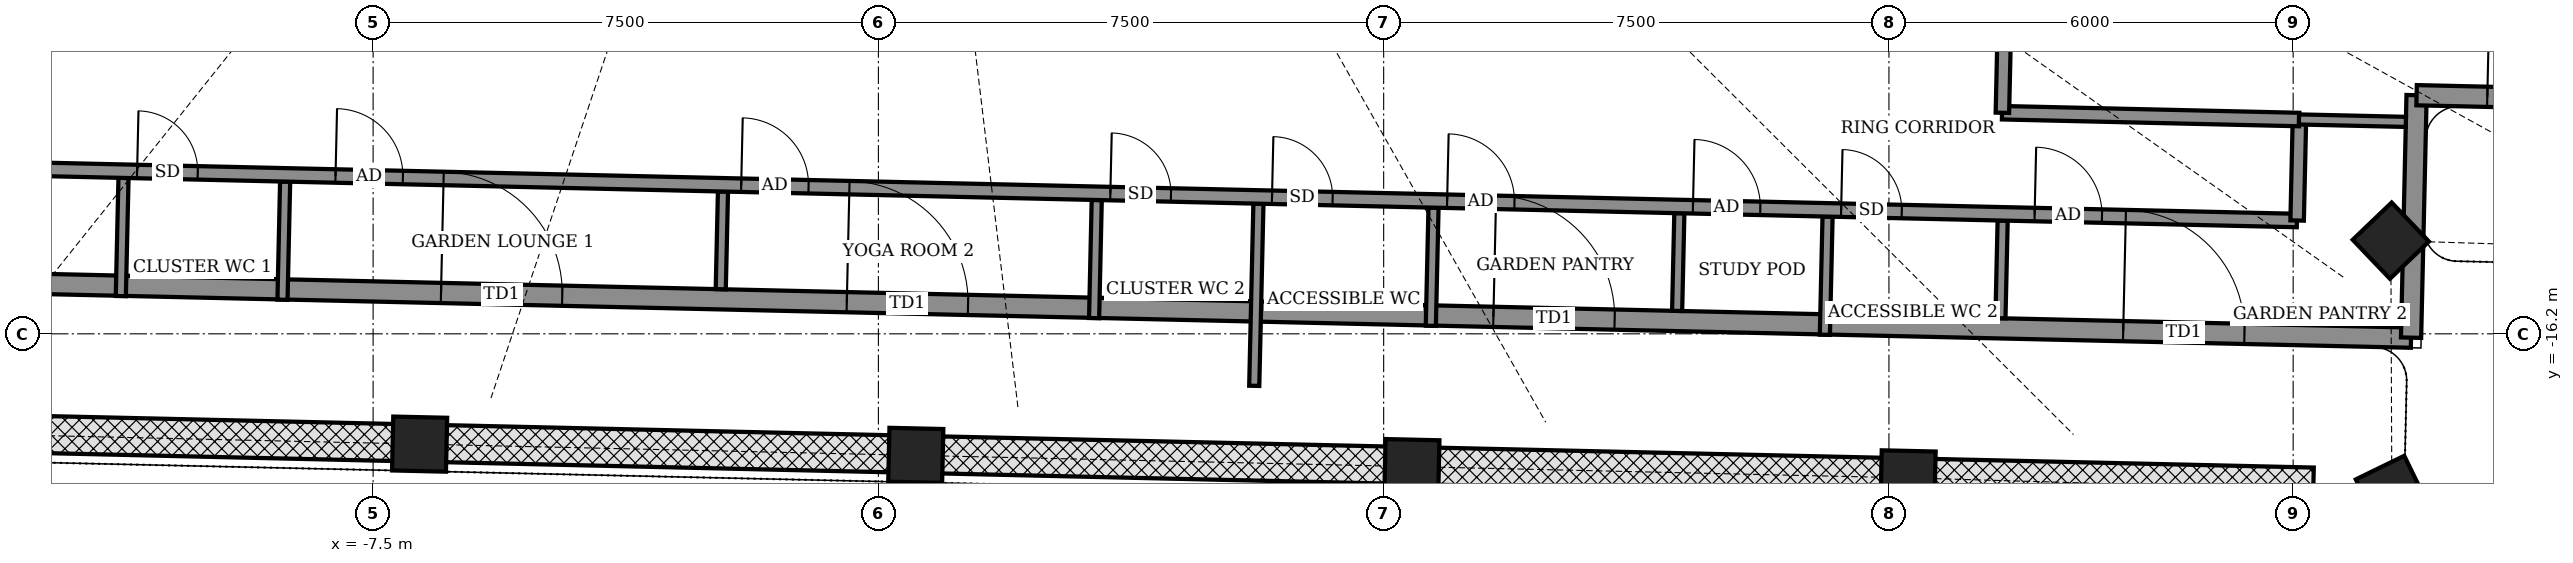
"""IFC4 building model, lengths in metres.
Left out: names, types, materials, properties, quantities, classifications, styles, units other than length and angle.
Written with IfcOpenShell. Run it as: python <this file> out.ifc"""

import sys

from ifc_helpers import new_model, si_unit, direction, frame, frame_2d, origin, origin_2d, place, context, subcontext, project, spatial, rectangle, extrude, element, fill, save


model = new_model("IFC4")
c1 = context("Model", 3, precision=1e-05, world=origin(), true_north=direction((0.0, 1.0)))
c2 = subcontext(c1, "Body", "Model", "MODEL_VIEW")
j1 = project(units=[si_unit("LENGTHUNIT", "METRE"), si_unit("PLANEANGLEUNIT", "RADIAN")], contexts=[c1])
p1 = place(None, origin())
s1 = spatial("IfcSite", under=j1, at=p1, CompositionType="ELEMENT")
p2 = place(p1, origin())
s2 = spatial("IfcBuilding", under=s1, at=p2, CompositionType="ELEMENT")
p3 = place(p2, frame((0.0, 0.0, 346.1)))
s3 = spatial("IfcBuildingStorey", under=s2, at=p3, CompositionType="ELEMENT", Elevation=346.1)
for number, where, z_axis, x_axis in (
    (1, (-6.81, -17.837, -0.55), (0.0, 0.0, 1.0), (1.0, -0.023, 0.0)),
    (2, (0.555, -18.004, -0.55), (0.0, 0.0, 1.0), (1.0, -0.023, 0.0)),
    (3, (7.919, -18.171, -0.55), (0.0, 0.0, 1.0), (1.0, -0.023, 0.0)),
    (4, (15.284, -18.338, -0.55), (0.0, 0.0, 1.0), (1.0, -0.023, 0.0)),
    (5, (22.465, -18.545, -0.55), (0.0, 0.0, 1.0), (0.899, 0.438, 0.0)),
    (6, (22.45, -14.817, -0.55), (0.0, 0.0, 1.0), (0.723, 0.691, 0.0)),
):
    element("IfcColumn", number, at=place(p3, frame(where, z_axis=z_axis, x_axis=x_axis)), inside=s3, PredefinedType="COLUMN", context=c2, shape_type="SweptSolid", body=[
        extrude(rectangle(XDim=0.8, YDim=0.8, at=origin_2d()), origin(), (0.0, 0.0, 1.0), 4.6),
    ])
p4 = place(p3, frame((-19.039, -15.309, 0.0), z_axis=(0.0, 0.0, 1.0), x_axis=(0.999742787513, -0.022679480066, 0.0)))
e7 = element("IfcWall", 7, at=p4, inside=s3, PredefinedType="SOLIDWALL", context=c2, shape_type="SweptSolid", body=[
    extrude(rectangle(XDim=41.8, YDim=0.3, at=frame_2d((20.9, 0.0))), origin(), (0.0, 0.0, 1.0), 2.75),
])
p5 = place(p4, frame((2.925, 0.0, 0.0)))
e8 = element("IfcOpeningElement", 8, at=p5, cuts=e7, PredefinedType="OPENING", context=c2, shape_type="SweptSolid", body=[
    extrude(rectangle(XDim=1.8, YDim=2.4, at=frame_2d((0.9, 1.2))), frame((0.0, 0.16, 0.0), z_axis=(0.0, -1.0, 0.0), x_axis=(1.0, 0.0, 0.0)), (0.0, 0.0, 1.0), 0.32),
])
p6 = place(p4, frame((12.55, 0.0, 0.0)))
e9 = element("IfcOpeningElement", 9, at=p6, cuts=e7, PredefinedType="OPENING", context=c2, shape_type="SweptSolid", body=[
    extrude(rectangle(XDim=1.8, YDim=2.4, at=frame_2d((0.9, 1.2))), frame((0.0, 0.16, 0.0), z_axis=(0.0, -1.0, 0.0), x_axis=(1.0, 0.0, 0.0)), (0.0, 0.0, 1.0), 0.32),
])
p7 = place(p4, frame((18.575, 0.0, 0.0)))
e10 = element("IfcOpeningElement", 10, at=p7, cuts=e7, PredefinedType="OPENING", context=c2, shape_type="SweptSolid", body=[
    extrude(rectangle(XDim=1.8, YDim=2.4, at=frame_2d((0.9, 1.2))), frame((0.0, 0.16, 0.0), z_axis=(0.0, -1.0, 0.0), x_axis=(1.0, 0.0, 0.0)), (0.0, 0.0, 1.0), 0.32),
])
p8 = place(p4, frame((28.175, 0.0, 0.0)))
e11 = element("IfcOpeningElement", 11, at=p8, cuts=e7, PredefinedType="OPENING", context=c2, shape_type="SweptSolid", body=[
    extrude(rectangle(XDim=1.8, YDim=2.4, at=frame_2d((0.9, 1.2))), frame((0.0, 0.16, 0.0), z_axis=(0.0, -1.0, 0.0), x_axis=(1.0, 0.0, 0.0)), (0.0, 0.0, 1.0), 0.32),
])
p9 = place(p4, frame((37.526, 0.0, 0.0)))
e12 = element("IfcOpeningElement", 12, at=p9, cuts=e7, PredefinedType="OPENING", context=c2, shape_type="SweptSolid", body=[
    extrude(rectangle(XDim=1.8, YDim=2.4, at=frame_2d((0.9, 1.2))), frame((0.0, 0.16, 0.0), z_axis=(0.0, -1.0, 0.0), x_axis=(1.0, 0.0, 0.0)), (0.0, 0.0, 1.0), 0.32),
])
p10 = place(p3, frame((22.75, -16.257, 0.0), z_axis=(0.0, 0.0, 1.0), x_axis=(0.02278610514, 0.999740363001, 0.0)))
e13 = element("IfcWall", 13, at=p10, inside=s3, PredefinedType="SOLIDWALL", context=c2, shape_type="SweptSolid", body=[
    extrude(rectangle(XDim=3.6, YDim=0.3, at=frame_2d((1.8, 0.0))), origin(), (0.0, 0.0, 1.0), 2.65),
])
p11 = place(p3, frame((22.832, -12.658, 0.0), z_axis=(0.0, 0.0, 1.0), x_axis=(0.999740327787, -0.022787650101, 0.0)))
e14 = element("IfcWall", 14, at=p11, inside=s3, PredefinedType="SOLIDWALL", context=c2, shape_type="SweptSolid", body=[
    extrude(rectangle(XDim=3.6, YDim=0.3, at=frame_2d((1.8, 0.0))), origin(), (0.0, 0.0, 1.0), 2.65),
])
p12 = place(p11, frame((1.05, 0.0, 0.0)))
e15 = element("IfcOpeningElement", 15, at=p12, cuts=e14, PredefinedType="OPENING", context=c2, shape_type="SweptSolid", body=[
    extrude(rectangle(XDim=1.8, YDim=2.4, at=frame_2d((0.9, 1.2))), frame((0.0, 0.16, 0.0), z_axis=(0.0, -1.0, 0.0), x_axis=(1.0, 0.0, 0.0)), (0.0, 0.0, 1.0), 0.32),
])
p13 = place(p3, frame((21.3, -18.46, 0.0), z_axis=(0.0, 0.0, 1.0), x_axis=(-0.9997424153, 0.022695881785, 0.0)))
e16 = element("IfcWall", 16, at=p13, inside=s3, PredefinedType="USERDEFINED", context=c2, shape_type="SweptSolid", body=[
    extrude(rectangle(XDim=41.501, YDim=0.55, at=frame_2d((20.75, 0.0))), origin(), (0.0, 0.0, 1.0), 0.8),
])
p14 = place(p3, frame((5.579, -16.972, 0.0), z_axis=(0.0, 0.0, 1.0), x_axis=(0.022928507921, 0.999737107206, 0.0)))
e17 = element("IfcWall", 17, at=p14, inside=s3, PredefinedType="PARTITIONING", context=c2, shape_type="SweptSolid", body=[
    extrude(rectangle(XDim=2.705, YDim=0.15, at=frame_2d((1.352, 0.0))), origin(), (0.0, 0.0, 1.0), 4.05),
])
p15 = place(p3, frame((-11.245, -15.64, 0.0), z_axis=(0.0, 0.0, 1.0), x_axis=(0.022822561686, 0.999739531417, 0.0)))
e18 = element("IfcWall", 18, at=p15, inside=s3, PredefinedType="PARTITIONING", context=c2, shape_type="SweptSolid", body=[
    extrude(rectangle(XDim=1.754, YDim=0.15, at=frame_2d((0.877, 0.0))), origin(), (0.0, 0.0, 1.0), 2.85),
])
p16 = place(p3, frame((-8.845, -15.694, 0.0), z_axis=(0.0, 0.0, 1.0), x_axis=(0.022275490778, 0.999751870471, 0.0)))
e19 = element("IfcWall", 19, at=p16, inside=s3, PredefinedType="PARTITIONING", context=c2, shape_type="SweptSolid", body=[
    extrude(rectangle(XDim=1.754, YDim=0.15, at=frame_2d((0.877, 0.0))), origin(), (0.0, 0.0, 1.0), 4.05),
])
p17 = place(p3, frame((3.202, -15.967, 0.0), z_axis=(0.0, 0.0, 1.0), x_axis=(0.022278591674, 0.999751801375, 0.0)))
e20 = element("IfcWall", 20, at=p17, inside=s3, PredefinedType="PARTITIONING", context=c2, shape_type="SweptSolid", body=[
    extrude(rectangle(XDim=1.753, YDim=0.15, at=frame_2d((0.877, 0.0))), origin(), (0.0, 0.0, 1.0), 4.05),
])
for number, where, z_axis, x_axis in (
    (21, (8.2, -16.081, 0.0), (0.0, 0.0, 1.0), (0.023, 1.0, 0.0)),
    (22, (14.049, -16.214, 0.0), (0.0, 0.0, 1.0), (0.023, 1.0, 0.0)),
):
    element("IfcWall", number, at=place(p3, frame(where, z_axis=z_axis, x_axis=x_axis)), inside=s3, PredefinedType="PARTITIONING", context=c2, shape_type="SweptSolid", body=[
        extrude(rectangle(XDim=1.755, YDim=0.15, at=frame_2d((0.877, 0.0))), origin(), (0.0, 0.0, 1.0), 2.85),
    ])
for number, where, z_axis, x_axis in (
    (23, (-2.34, -15.538, 0.0), (0.0, 0.0, 1.0), (0.023, 1.0, 0.0)),
    (24, (11.856, -15.86, 0.0), (0.0, 0.0, 1.0), (0.023, 1.0, 0.0)),
):
    element("IfcWall", number, at=place(p3, frame(where, z_axis=z_axis, x_axis=x_axis)), inside=s3, PredefinedType="PARTITIONING", context=c2, shape_type="SweptSolid", body=[
        extrude(rectangle(XDim=1.451, YDim=0.15, at=frame_2d((0.725, 0.0))), origin(), (0.0, 0.0, 1.0), 4.05),
    ])
p18 = place(p3, frame((16.655, -15.969, 0.0), z_axis=(0.0, 0.0, 1.0), x_axis=(0.022725229174, 0.999741748633, 0.0)))
e25 = element("IfcWall", 25, at=p18, inside=s3, PredefinedType="PARTITIONING", context=c2, shape_type="SweptSolid", body=[
    extrude(rectangle(XDim=1.45, YDim=0.15, at=frame_2d((0.725, 0.0))), origin(), (0.0, 0.0, 1.0), 2.85),
])
p19 = place(p3, frame((-19.351, -13.601, 0.0), z_axis=(0.0, 0.0, 1.0), x_axis=(0.999742592778, -0.02268806261, 0.0)))
e26 = element("IfcWall", 26, at=p19, inside=s3, PredefinedType="PARTITIONING", context=c2, shape_type="SweptSolid", body=[
    extrude(rectangle(XDim=40.417, YDim=0.2, at=frame_2d((20.209, 0.0))), origin(), (0.0, 0.0, 1.0), 2.85),
])
p20 = place(p19, frame((2.663, 0.0, 0.0)))
e27 = element("IfcOpeningElement", 27, at=p20, cuts=e26, PredefinedType="OPENING", context=c2, shape_type="SweptSolid", body=[
    extrude(rectangle(XDim=1.0, YDim=2.1, at=frame_2d((0.5, 1.05))), frame((0.0, 0.11, 0.0), z_axis=(0.0, -1.0, 0.0), x_axis=(1.0, 0.0, 0.0)), (0.0, 0.0, 1.0), 0.22),
])
p21 = place(p19, frame((11.296, 0.0, 0.0)))
e28 = element("IfcOpeningElement", 28, at=p21, cuts=e26, PredefinedType="OPENING", context=c2, shape_type="SweptSolid", body=[
    extrude(rectangle(XDim=1.0, YDim=2.1, at=frame_2d((0.5, 1.05))), frame((0.0, 0.11, 0.0), z_axis=(0.0, -1.0, 0.0), x_axis=(1.0, 0.0, 0.0)), (0.0, 0.0, 1.0), 0.22),
])
p22 = place(p19, frame((8.35, 0.0, 0.0)))
e29 = element("IfcOpeningElement", 29, at=p22, cuts=e26, PredefinedType="OPENING", context=c2, shape_type="SweptSolid", body=[
    extrude(rectangle(XDim=0.9, YDim=2.1, at=frame_2d((0.45, 1.05))), frame((0.0, 0.11, 0.0), z_axis=(0.0, -1.0, 0.0), x_axis=(1.0, 0.0, 0.0)), (0.0, 0.0, 1.0), 0.22),
])
p23 = place(p19, frame((17.319, 0.0, 0.0)))
e30 = element("IfcOpeningElement", 30, at=p23, cuts=e26, PredefinedType="OPENING", context=c2, shape_type="SweptSolid", body=[
    extrude(rectangle(XDim=1.0, YDim=2.1, at=frame_2d((0.5, 1.05))), frame((0.0, 0.11, 0.0), z_axis=(0.0, -1.0, 0.0), x_axis=(1.0, 0.0, 0.0)), (0.0, 0.0, 1.0), 0.22),
])
p24 = place(p19, frame((22.8, 0.0, 0.0)))
e31 = element("IfcOpeningElement", 31, at=p24, cuts=e26, PredefinedType="OPENING", context=c2, shape_type="SweptSolid", body=[
    extrude(rectangle(XDim=0.9, YDim=2.1, at=frame_2d((0.45, 1.05))), frame((0.0, 0.11, 0.0), z_axis=(0.0, -1.0, 0.0), x_axis=(1.0, 0.0, 0.0)), (0.0, 0.0, 1.0), 0.22),
])
p25 = place(p19, frame((27.8, 0.0, 0.0)))
e32 = element("IfcOpeningElement", 32, at=p25, cuts=e26, PredefinedType="OPENING", context=c2, shape_type="SweptSolid", body=[
    extrude(rectangle(XDim=1.0, YDim=2.1, at=frame_2d((0.5, 1.05))), frame((0.0, 0.11, 0.0), z_axis=(0.0, -1.0, 0.0), x_axis=(1.0, 0.0, 0.0)), (0.0, 0.0, 1.0), 0.22),
])
p26 = place(p19, frame((25.2, 0.0, 0.0)))
e33 = element("IfcOpeningElement", 33, at=p26, cuts=e26, PredefinedType="OPENING", context=c2, shape_type="SweptSolid", body=[
    extrude(rectangle(XDim=0.9, YDim=2.1, at=frame_2d((0.45, 1.05))), frame((0.0, 0.11, 0.0), z_axis=(0.0, -1.0, 0.0), x_axis=(1.0, 0.0, 0.0)), (0.0, 0.0, 1.0), 0.22),
])
p27 = place(p19, frame((31.45, 0.0, 0.0)))
e34 = element("IfcOpeningElement", 34, at=p27, cuts=e26, PredefinedType="OPENING", context=c2, shape_type="SweptSolid", body=[
    extrude(rectangle(XDim=1.0, YDim=2.1, at=frame_2d((0.5, 1.05))), frame((0.0, 0.11, 0.0), z_axis=(0.0, -1.0, 0.0), x_axis=(1.0, 0.0, 0.0)), (0.0, 0.0, 1.0), 0.22),
])
p28 = place(p19, frame((33.65, 0.0, 0.0)))
e35 = element("IfcOpeningElement", 35, at=p28, cuts=e26, PredefinedType="OPENING", context=c2, shape_type="SweptSolid", body=[
    extrude(rectangle(XDim=0.9, YDim=2.1, at=frame_2d((0.45, 1.05))), frame((0.0, 0.11, 0.0), z_axis=(0.0, -1.0, 0.0), x_axis=(1.0, 0.0, 0.0)), (0.0, 0.0, 1.0), 0.22),
])
p29 = place(p19, frame((36.523, 0.0, 0.0)))
e36 = element("IfcOpeningElement", 36, at=p29, cuts=e26, PredefinedType="OPENING", context=c2, shape_type="SweptSolid", body=[
    extrude(rectangle(XDim=1.0, YDim=2.1, at=frame_2d((0.5, 1.05))), frame((0.0, 0.11, 0.0), z_axis=(0.0, -1.0, 0.0), x_axis=(1.0, 0.0, 0.0)), (0.0, 0.0, 1.0), 0.22),
])
p30 = place(p3, frame((21.059, -14.518, 0.0), z_axis=(0.0, 0.0, 1.0), x_axis=(0.022632637625, 0.99974384905, 0.0)))
e37 = element("IfcWall", 37, at=p30, inside=s3, PredefinedType="PARTITIONING", context=c2, shape_type="SweptSolid", body=[
    extrude(rectangle(XDim=1.5, YDim=0.2, at=frame_2d((0.75, 0.0))), origin(), (0.0, 0.0, 1.0), 2.85),
])
p31 = place(p3, frame((16.679, -12.918, 0.0), z_axis=(0.0, 0.0, 1.0), x_axis=(0.999737590501, -0.022907425419, 0.0)))
e38 = element("IfcWall", 38, at=p31, inside=s3, PredefinedType="PARTITIONING", context=c2, shape_type="SweptSolid", body=[
    extrude(rectangle(XDim=4.412, YDim=0.2, at=frame_2d((2.206, 0.0))), origin(), (0.0, 0.0, 1.0), 2.85),
])
p32 = place(p3, frame((16.684, -12.919, 0.0), z_axis=(0.0, 0.0, 1.0), x_axis=(0.022667483124, 0.999743059595, 0.0)))
e39 = element("IfcWall", 39, at=p32, inside=s3, PredefinedType="PARTITIONING", context=c2, shape_type="SweptSolid", body=[
    extrude(rectangle(XDim=5.245, YDim=0.2, at=frame_2d((2.623, 0.0))), origin(), (0.0, 0.0, 1.0), 2.65),
])
p33 = place(p32, frame((1.041, 0.0, 0.0)))
e40 = element("IfcOpeningElement", 40, at=p33, cuts=e39, PredefinedType="OPENING", context=c2, shape_type="SweptSolid", body=[
    extrude(rectangle(XDim=1.0, YDim=2.1, at=frame_2d((0.5, 1.05))), frame((0.0, 0.11, 0.0), z_axis=(0.0, -1.0, 0.0), x_axis=(1.0, 0.0, 0.0)), (0.0, 0.0, 1.0), 0.22),
])
p34 = place(p3, frame((21.086, -13.018, 0.0), z_axis=(0.0, 0.0, 1.0), x_axis=(0.99974444885, -0.022606127362, 0.0)))
e41 = element("IfcWall", 41, at=p34, inside=s3, PredefinedType="PARTITIONING", context=c2, shape_type="SweptSolid", body=[
    extrude(rectangle(XDim=1.588, YDim=0.15, at=frame_2d((0.794, 0.0))), origin(), (0.0, 0.0, 1.0), 2.65),
])
p35 = place(p6, origin())
e42 = element("IfcDoor", 42, at=p35, inside=s3, OperationType="DOUBLE_DOOR_SINGLE_SWING", PredefinedType="DOOR", context=c2, shape_type="SweptSolid", body=[
    extrude(rectangle(XDim=1.8, YDim=2.4, at=frame_2d((0.9, 1.2))), frame((0.0, 0.025, 0.0), z_axis=(0.0, -1.0, 0.0), x_axis=(1.0, 0.0, 0.0)), (0.0, 0.0, 1.0), 0.05),
])
fill(e9, e42)
p36 = place(p7, origin())
e43 = element("IfcDoor", 43, at=p36, inside=s3, OperationType="DOUBLE_DOOR_SINGLE_SWING", PredefinedType="DOOR", context=c2, shape_type="SweptSolid", body=[
    extrude(rectangle(XDim=1.8, YDim=2.4, at=frame_2d((0.9, 1.2))), frame((0.0, 0.025, 0.0), z_axis=(0.0, -1.0, 0.0), x_axis=(1.0, 0.0, 0.0)), (0.0, 0.0, 1.0), 0.05),
])
fill(e10, e43)
p37 = place(p8, origin())
e44 = element("IfcDoor", 44, at=p37, inside=s3, OperationType="DOUBLE_DOOR_SINGLE_SWING", PredefinedType="DOOR", context=c2, shape_type="SweptSolid", body=[
    extrude(rectangle(XDim=1.8, YDim=2.4, at=frame_2d((0.9, 1.2))), frame((0.0, 0.025, 0.0), z_axis=(0.0, -1.0, 0.0), x_axis=(1.0, 0.0, 0.0)), (0.0, 0.0, 1.0), 0.05),
])
fill(e11, e44)
p38 = place(p9, origin())
e45 = element("IfcDoor", 45, at=p38, inside=s3, OperationType="DOUBLE_DOOR_SINGLE_SWING", PredefinedType="DOOR", context=c2, shape_type="SweptSolid", body=[
    extrude(rectangle(XDim=1.8, YDim=2.4, at=frame_2d((0.9, 1.2))), frame((0.0, 0.025, 0.0), z_axis=(0.0, -1.0, 0.0), x_axis=(1.0, 0.0, 0.0)), (0.0, 0.0, 1.0), 0.05),
])
fill(e12, e45)
p39 = place(p12, origin())
e46 = element("IfcDoor", 46, at=p39, inside=s3, OperationType="DOUBLE_DOOR_SINGLE_SWING", PredefinedType="DOOR", context=c2, shape_type="SweptSolid", body=[
    extrude(rectangle(XDim=1.8, YDim=2.4, at=frame_2d((0.9, 1.2))), frame((0.0, 0.025, 0.0), z_axis=(0.0, -1.0, 0.0), x_axis=(1.0, 0.0, 0.0)), (0.0, 0.0, 1.0), 0.05),
])
fill(e15, e46)
p40 = place(p21, origin())
e47 = element("IfcDoor", 47, at=p40, inside=s3, OperationType="SINGLE_SWING_RIGHT", PredefinedType="DOOR", context=c2, shape_type="SweptSolid", body=[
    extrude(rectangle(XDim=1.0, YDim=2.1, at=frame_2d((0.5, 1.05))), frame((0.0, 0.025, 0.0), z_axis=(0.0, -1.0, 0.0), x_axis=(1.0, 0.0, 0.0)), (0.0, 0.0, 1.0), 0.05),
])
fill(e28, e47)
p41 = place(p22, origin())
e48 = element("IfcDoor", 48, at=p41, inside=s3, OperationType="SINGLE_SWING_LEFT", PredefinedType="DOOR", context=c2, shape_type="SweptSolid", body=[
    extrude(rectangle(XDim=0.9, YDim=2.1, at=frame_2d((0.45, 1.05))), frame((0.0, 0.025, 0.0), z_axis=(0.0, -1.0, 0.0), x_axis=(1.0, 0.0, 0.0)), (0.0, 0.0, 1.0), 0.05),
])
fill(e29, e48)
p42 = place(p23, origin())
e49 = element("IfcDoor", 49, at=p42, inside=s3, OperationType="SINGLE_SWING_LEFT", PredefinedType="DOOR", context=c2, shape_type="SweptSolid", body=[
    extrude(rectangle(XDim=1.0, YDim=2.1, at=frame_2d((0.5, 1.05))), frame((0.0, 0.025, 0.0), z_axis=(0.0, -1.0, 0.0), x_axis=(1.0, 0.0, 0.0)), (0.0, 0.0, 1.0), 0.05),
])
fill(e30, e49)
p43 = place(p24, origin())
e50 = element("IfcDoor", 50, at=p43, inside=s3, OperationType="SINGLE_SWING_RIGHT", PredefinedType="DOOR", context=c2, shape_type="SweptSolid", body=[
    extrude(rectangle(XDim=0.9, YDim=2.1, at=frame_2d((0.45, 1.05))), frame((0.0, 0.025, 0.0), z_axis=(0.0, -1.0, 0.0), x_axis=(1.0, 0.0, 0.0)), (0.0, 0.0, 1.0), 0.05),
])
fill(e31, e50)
p44 = place(p25, origin())
e51 = element("IfcDoor", 51, at=p44, inside=s3, OperationType="SINGLE_SWING_RIGHT", PredefinedType="DOOR", context=c2, shape_type="SweptSolid", body=[
    extrude(rectangle(XDim=1.0, YDim=2.1, at=frame_2d((0.5, 1.05))), frame((0.0, 0.025, 0.0), z_axis=(0.0, -1.0, 0.0), x_axis=(1.0, 0.0, 0.0)), (0.0, 0.0, 1.0), 0.05),
])
fill(e32, e51)
p45 = place(p26, origin())
e52 = element("IfcDoor", 52, at=p45, inside=s3, OperationType="SINGLE_SWING_LEFT", PredefinedType="DOOR", context=c2, shape_type="SweptSolid", body=[
    extrude(rectangle(XDim=0.9, YDim=2.1, at=frame_2d((0.45, 1.05))), frame((0.0, 0.025, 0.0), z_axis=(0.0, -1.0, 0.0), x_axis=(1.0, 0.0, 0.0)), (0.0, 0.0, 1.0), 0.05),
])
fill(e33, e52)
p46 = place(p27, origin())
e53 = element("IfcDoor", 53, at=p46, inside=s3, OperationType="SINGLE_SWING_LEFT", PredefinedType="DOOR", context=c2, shape_type="SweptSolid", body=[
    extrude(rectangle(XDim=1.0, YDim=2.1, at=frame_2d((0.5, 1.05))), frame((0.0, 0.025, 0.0), z_axis=(0.0, -1.0, 0.0), x_axis=(1.0, 0.0, 0.0)), (0.0, 0.0, 1.0), 0.05),
])
fill(e34, e53)
p47 = place(p28, origin())
e54 = element("IfcDoor", 54, at=p47, inside=s3, OperationType="SINGLE_SWING_RIGHT", PredefinedType="DOOR", context=c2, shape_type="SweptSolid", body=[
    extrude(rectangle(XDim=0.9, YDim=2.1, at=frame_2d((0.45, 1.05))), frame((0.0, 0.025, 0.0), z_axis=(0.0, -1.0, 0.0), x_axis=(1.0, 0.0, 0.0)), (0.0, 0.0, 1.0), 0.05),
])
fill(e35, e54)
p48 = place(p29, origin())
e55 = element("IfcDoor", 55, at=p48, inside=s3, OperationType="SINGLE_SWING_RIGHT", PredefinedType="DOOR", context=c2, shape_type="SweptSolid", body=[
    extrude(rectangle(XDim=1.0, YDim=2.1, at=frame_2d((0.5, 1.05))), frame((0.0, 0.025, 0.0), z_axis=(0.0, -1.0, 0.0), x_axis=(1.0, 0.0, 0.0)), (0.0, 0.0, 1.0), 0.05),
])
fill(e36, e55)
save(model, sys.argv[1])
